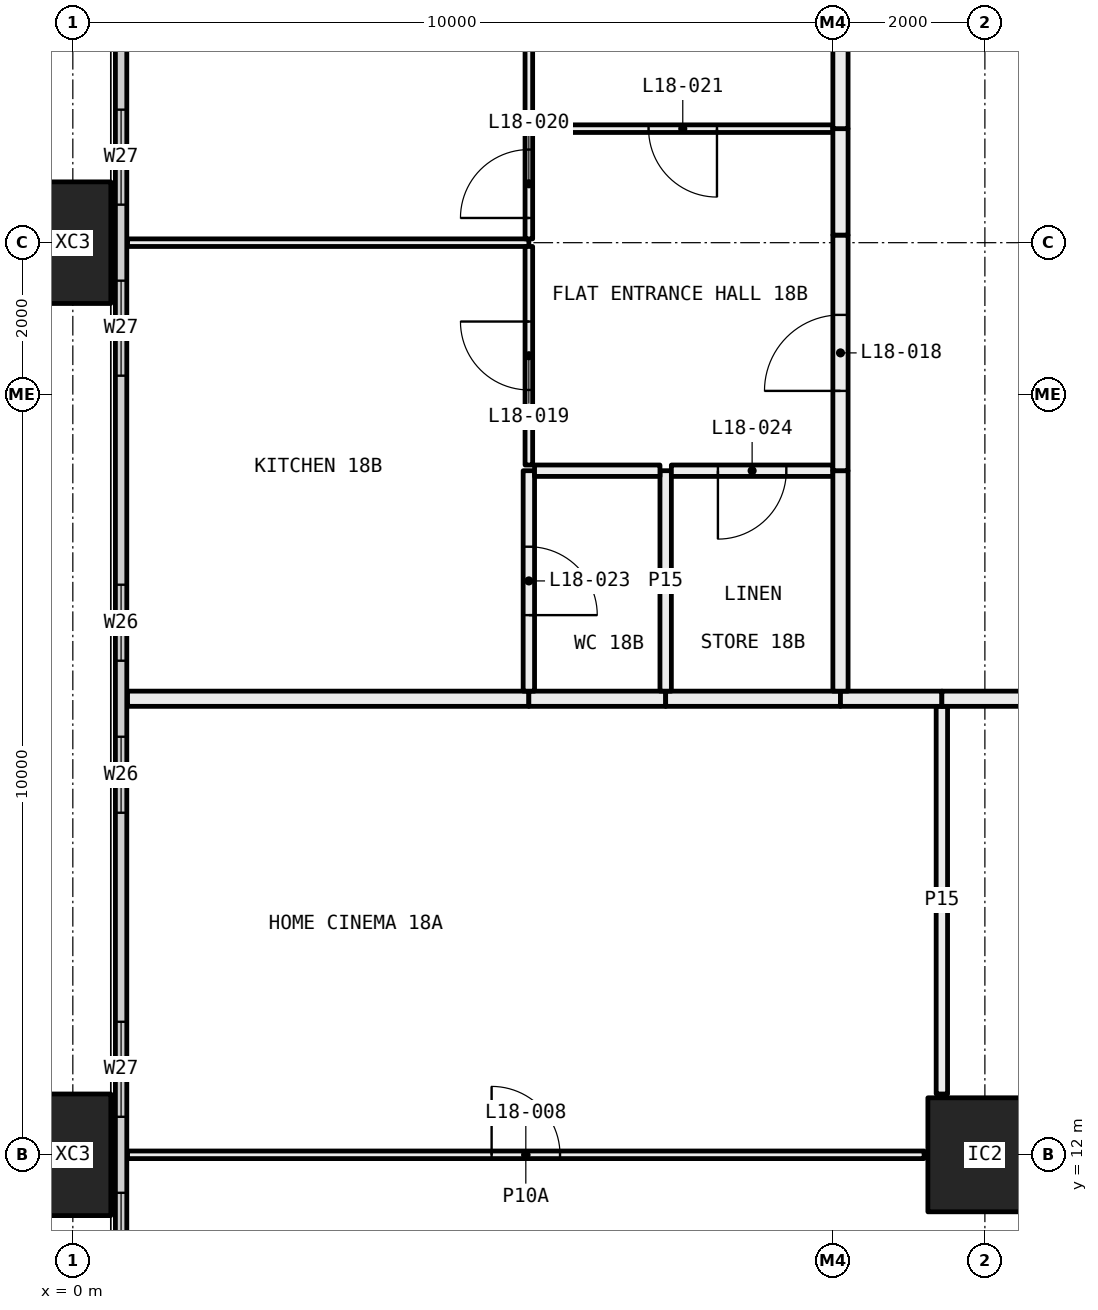
"""IFC4 building model, lengths in metres.
Left out: names, types, materials, properties, quantities, classifications, styles, units other than length and angle.
Written with IfcOpenShell. Run it as: python <this file> out.ifc"""

import sys

from ifc_helpers import new_model, si_unit, direction, frame, frame_2d, origin, origin_2d, place, context, subcontext, project, spatial, rectangle, hollow_rectangle, extrude, element, fill, save


model = new_model("IFC4")
c1 = context("Model", 3, precision=1e-05, world=origin(), true_north=direction((0.0, 1.0)))
c2 = subcontext(c1, "Body", "Model", "MODEL_VIEW")
j1 = project(units=[si_unit("LENGTHUNIT", "METRE"), si_unit("PLANEANGLEUNIT", "RADIAN")], contexts=[c1])
p1 = place(None, origin())
s1 = spatial("IfcSite", under=j1, at=p1, CompositionType="ELEMENT")
p2 = place(p1, origin())
s2 = spatial("IfcBuilding", under=s1, at=p2, CompositionType="ELEMENT")
p3 = place(p2, frame((0.0, 0.0, 74.85)))
s3 = spatial("IfcBuildingStorey", under=s2, at=p3, CompositionType="ELEMENT", Elevation=74.85)
for number, where, z_axis, x_axis in (
    (1, (0.0, 12.0, -0.4), (0.0, 0.0, 1.0), (0.0, 1.0, 0.0)),
    (2, (0.0, 24.0, -0.4), (0.0, 0.0, 1.0), (0.0, 1.0, 0.0)),
):
    element("IfcColumn", number, at=place(p3, frame(where, z_axis=z_axis, x_axis=x_axis)), inside=s3, PredefinedType="COLUMN", context=c2, shape_type="SweptSolid", body=[
        extrude(hollow_rectangle(XDim=1.6, YDim=1.0, WallThickness=0.065, at=origin_2d()), origin(), (0.0, 0.0, 1.0), 3.45),
    ])
p4 = place(p3, frame((12.0, 12.0, 0.0), z_axis=(0.0, 0.0, 1.0), x_axis=(1.0, 0.0, 0.0)))
e3 = element("IfcColumn", 3, at=p4, inside=s3, PredefinedType="COLUMN", context=c2, shape_type="SweptSolid", body=[
    extrude(hollow_rectangle(XDim=1.5, YDim=1.5, WallThickness=0.065, at=origin_2d()), origin(), (0.0, 0.0, 1.0), 3.05),
])
p5 = place(p3, frame((0.635, 6.71, 0.0), z_axis=(0.0, 0.0, 1.0), x_axis=(0.0, 1.0, 0.0)))
e4 = element("IfcWall", 4, at=p5, inside=s3, PredefinedType="ELEMENTEDWALL", context=c2, shape_type="SweptSolid", body=[
    extrude(rectangle(XDim=34.58, YDim=0.15, at=frame_2d((17.29, 0.0))), origin(), (0.0, 0.0, 1.0), 3.05),
])
p6 = place(p5, frame((0.29, 0.0, 0.45)))
e5 = element("IfcOpeningElement", 5, at=p6, cuts=e4, PredefinedType="OPENING", context=c2, shape_type="SweptSolid", body=[
    extrude(rectangle(XDim=4.5, YDim=2.55, at=frame_2d((2.25, 1.275))), frame((0.0, 0.085, 0.0), z_axis=(0.0, -1.0, 0.0), x_axis=(1.0, 0.0, 0.0)), (0.0, 0.0, 1.0), 0.17),
])
p7 = place(p5, frame((5.79, 0.0, 0.45)))
e6 = element("IfcOpeningElement", 6, at=p7, cuts=e4, PredefinedType="OPENING", context=c2, shape_type="SweptSolid", body=[
    extrude(rectangle(XDim=1.25, YDim=2.55, at=frame_2d((0.625, 1.275))), frame((0.0, 0.085, 0.0), z_axis=(0.0, -1.0, 0.0), x_axis=(1.0, 0.0, 0.0)), (0.0, 0.0, 1.0), 0.17),
])
p8 = place(p5, frame((9.79, 0.0, 0.45)))
e7 = element("IfcOpeningElement", 7, at=p8, cuts=e4, PredefinedType="OPENING", context=c2, shape_type="SweptSolid", body=[
    extrude(rectangle(XDim=1.0, YDim=2.55, at=frame_2d((0.5, 1.275))), frame((0.0, 0.085, 0.0), z_axis=(0.0, -1.0, 0.0), x_axis=(1.0, 0.0, 0.0)), (0.0, 0.0, 1.0), 0.17),
])
p9 = place(p5, frame((11.79, 0.0, 0.45)))
e8 = element("IfcOpeningElement", 8, at=p9, cuts=e4, PredefinedType="OPENING", context=c2, shape_type="SweptSolid", body=[
    extrude(rectangle(XDim=1.0, YDim=2.55, at=frame_2d((0.5, 1.275))), frame((0.0, 0.085, 0.0), z_axis=(0.0, -1.0, 0.0), x_axis=(1.0, 0.0, 0.0)), (0.0, 0.0, 1.0), 0.17),
])
p10 = place(p5, frame((15.54, 0.0, 0.45)))
e9 = element("IfcOpeningElement", 9, at=p10, cuts=e4, PredefinedType="OPENING", context=c2, shape_type="SweptSolid", body=[
    extrude(rectangle(XDim=1.25, YDim=2.55, at=frame_2d((0.625, 1.275))), frame((0.0, 0.085, 0.0), z_axis=(0.0, -1.0, 0.0), x_axis=(1.0, 0.0, 0.0)), (0.0, 0.0, 1.0), 0.17),
])
p11 = place(p5, frame((17.79, 0.0, 0.45)))
e10 = element("IfcOpeningElement", 10, at=p11, cuts=e4, PredefinedType="OPENING", context=c2, shape_type="SweptSolid", body=[
    extrude(rectangle(XDim=1.25, YDim=2.55, at=frame_2d((0.625, 1.275))), frame((0.0, 0.085, 0.0), z_axis=(0.0, -1.0, 0.0), x_axis=(1.0, 0.0, 0.0)), (0.0, 0.0, 1.0), 0.17),
])
p12 = place(p5, frame((21.79, 0.0, 0.45)))
e11 = element("IfcOpeningElement", 11, at=p12, cuts=e4, PredefinedType="OPENING", context=c2, shape_type="SweptSolid", body=[
    extrude(rectangle(XDim=1.0, YDim=2.55, at=frame_2d((0.5, 1.275))), frame((0.0, 0.085, 0.0), z_axis=(0.0, -1.0, 0.0), x_axis=(1.0, 0.0, 0.0)), (0.0, 0.0, 1.0), 0.17),
])
p13 = place(p5, frame((23.79, 0.0, 0.45)))
e12 = element("IfcOpeningElement", 12, at=p13, cuts=e4, PredefinedType="OPENING", context=c2, shape_type="SweptSolid", body=[
    extrude(rectangle(XDim=1.0, YDim=2.55, at=frame_2d((0.5, 1.275))), frame((0.0, 0.085, 0.0), z_axis=(0.0, -1.0, 0.0), x_axis=(1.0, 0.0, 0.0)), (0.0, 0.0, 1.0), 0.17),
])
p14 = place(p5, frame((27.54, 0.0, 0.45)))
e13 = element("IfcOpeningElement", 13, at=p14, cuts=e4, PredefinedType="OPENING", context=c2, shape_type="SweptSolid", body=[
    extrude(rectangle(XDim=1.25, YDim=2.55, at=frame_2d((0.625, 1.275))), frame((0.0, 0.085, 0.0), z_axis=(0.0, -1.0, 0.0), x_axis=(1.0, 0.0, 0.0)), (0.0, 0.0, 1.0), 0.17),
])
p15 = place(p5, frame((29.79, 0.0, 0.45)))
e14 = element("IfcOpeningElement", 14, at=p15, cuts=e4, PredefinedType="OPENING", context=c2, shape_type="SweptSolid", body=[
    extrude(rectangle(XDim=4.5, YDim=2.55, at=frame_2d((2.25, 1.275))), frame((0.0, 0.085, 0.0), z_axis=(0.0, -1.0, 0.0), x_axis=(1.0, 0.0, 0.0)), (0.0, 0.0, 1.0), 0.17),
])
p16 = place(p3, frame((11.2, 12.0, 0.0), z_axis=(0.0, 0.0, 1.0), x_axis=(-1.0, 0.0, 0.0)))
e15 = element("IfcWall", 15, at=p16, inside=s3, PredefinedType="PARTITIONING", context=c2, shape_type="SweptSolid", body=[
    extrude(rectangle(XDim=10.48, YDim=0.1, at=frame_2d((5.24, 0.0))), origin(), (0.0, 0.0, 1.0), 2.45),
])
p17 = place(p16, frame((4.79, 0.0, 0.0)))
e16 = element("IfcOpeningElement", 16, at=p17, cuts=e15, PredefinedType="OPENING", context=c2, shape_type="SweptSolid", body=[
    extrude(rectangle(XDim=0.9, YDim=2.1, at=frame_2d((0.45, 1.05))), frame((0.0, 0.06, 0.0), z_axis=(0.0, -1.0, 0.0), x_axis=(1.0, 0.0, 0.0)), (0.0, 0.0, 1.0), 0.12),
])
p18 = place(p3, frame((11.434, 12.8, 0.0), z_axis=(0.0, 0.0, 1.0), x_axis=(0.0, 1.0, 0.0)))
e17 = element("IfcWall", 17, at=p18, inside=s3, PredefinedType="PARTITIONING", context=c2, shape_type="SweptSolid", body=[
    extrude(rectangle(XDim=5.1, YDim=0.15, at=frame_2d((2.55, 0.0))), origin(), (0.0, 0.0, 1.0), 3.05),
])
p19 = place(p3, frame((6.0, 18.0, 0.0), z_axis=(0.0, 0.0, 1.0), x_axis=(-1.0, 0.0, 0.0)))
e18 = element("IfcWall", 18, at=p19, inside=s3, PredefinedType="PARTITIONING", context=c2, shape_type="SweptSolid", body=[
    extrude(rectangle(XDim=5.28, YDim=0.2, at=frame_2d((2.64, 0.0))), origin(), (0.0, 0.0, 1.0), 3.05),
])
p20 = place(p3, frame((7.8, 18.0, 0.0), z_axis=(0.0, 0.0, 1.0), x_axis=(-1.0, 0.0, 0.0)))
e19 = element("IfcWall", 19, at=p20, inside=s3, PredefinedType="PARTITIONING", context=c2, shape_type="SweptSolid", body=[
    extrude(rectangle(XDim=1.8, YDim=0.2, at=frame_2d((0.9, 0.0))), origin(), (0.0, 0.0, 1.0), 3.05),
])
p21 = place(p3, frame((10.1, 18.0, 0.0), z_axis=(0.0, 0.0, 1.0), x_axis=(-1.0, 0.0, 0.0)))
e20 = element("IfcWall", 20, at=p21, inside=s3, PredefinedType="PARTITIONING", context=c2, shape_type="SweptSolid", body=[
    extrude(rectangle(XDim=2.3, YDim=0.2, at=frame_2d((1.15, 0.0))), origin(), (0.0, 0.0, 1.0), 3.05),
])
p22 = place(p3, frame((11.434, 18.0, 0.0), z_axis=(0.0, 0.0, 1.0), x_axis=(-1.0, 0.0, 0.0)))
e21 = element("IfcWall", 21, at=p22, inside=s3, PredefinedType="PARTITIONING", context=c2, shape_type="SweptSolid", body=[
    extrude(rectangle(XDim=1.334, YDim=0.2, at=frame_2d((0.667, 0.0))), origin(), (0.0, 0.0, 1.0), 3.05),
])
p23 = place(p3, frame((18.0, 18.0, 0.0), z_axis=(0.0, 0.0, 1.0), x_axis=(-1.0, 0.0, 0.0)))
e22 = element("IfcWall", 22, at=p23, inside=s3, PredefinedType="PARTITIONING", context=c2, shape_type="SweptSolid", body=[
    extrude(rectangle(XDim=6.566, YDim=0.2, at=frame_2d((3.283, 0.0))), origin(), (0.0, 0.0, 1.0), 3.05),
])
p24 = place(p3, frame((6.0, 24.0, 0.0), z_axis=(0.0, 0.0, 1.0), x_axis=(-1.0, 0.0, 0.0)))
e23 = element("IfcWall", 23, at=p24, inside=s3, PredefinedType="PARTITIONING", context=c2, shape_type="SweptSolid", body=[
    extrude(rectangle(XDim=5.28, YDim=0.1, at=frame_2d((2.64, 0.0))), origin(), (0.0, 0.0, 1.0), 2.45),
])
p25 = place(p3, frame((6.0, 18.1, 0.0), z_axis=(0.0, 0.0, 1.0), x_axis=(0.0, 1.0, 0.0)))
e24 = element("IfcWall", 24, at=p25, inside=s3, PredefinedType="PARTITIONING", context=c2, shape_type="SweptSolid", body=[
    extrude(rectangle(XDim=2.9, YDim=0.15, at=frame_2d((1.45, 0.0))), origin(), (0.0, 0.0, 1.0), 3.05),
])
p26 = place(p25, frame((1.0, 0.0, 0.0)))
e25 = element("IfcOpeningElement", 25, at=p26, cuts=e24, PredefinedType="OPENING", context=c2, shape_type="SweptSolid", body=[
    extrude(rectangle(XDim=0.9, YDim=2.1, at=frame_2d((0.45, 1.05))), frame((0.0, 0.085, 0.0), z_axis=(0.0, -1.0, 0.0), x_axis=(1.0, 0.0, 0.0)), (0.0, 0.0, 1.0), 0.17),
])
p27 = place(p3, frame((6.0, 21.075, 0.0), z_axis=(0.0, 0.0, 1.0), x_axis=(0.0, 1.0, 0.0)))
e26 = element("IfcWall", 26, at=p27, inside=s3, PredefinedType="PARTITIONING", context=c2, shape_type="SweptSolid", body=[
    extrude(rectangle(XDim=2.875, YDim=0.1, at=frame_2d((1.438, 0.0))), origin(), (0.0, 0.0, 1.0), 2.45),
])
p28 = place(p27, frame((0.988, 0.0, 0.0)))
e27 = element("IfcOpeningElement", 27, at=p28, cuts=e26, PredefinedType="OPENING", context=c2, shape_type="SweptSolid", body=[
    extrude(rectangle(XDim=0.9, YDim=2.1, at=frame_2d((0.45, 1.05))), frame((0.0, 0.06, 0.0), z_axis=(0.0, -1.0, 0.0), x_axis=(1.0, 0.0, 0.0)), (0.0, 0.0, 1.0), 0.12),
])
p29 = place(p3, frame((6.0, 24.05, 0.0), z_axis=(0.0, 0.0, 1.0), x_axis=(0.0, 1.0, 0.0)))
e28 = element("IfcWall", 28, at=p29, inside=s3, PredefinedType="PARTITIONING", context=c2, shape_type="SweptSolid", body=[
    extrude(rectangle(XDim=1.45, YDim=0.1, at=frame_2d((0.725, 0.0))), origin(), (0.0, 0.0, 1.0), 2.45),
])
p30 = place(p29, frame((0.275, 0.0, 0.0)))
e29 = element("IfcOpeningElement", 29, at=p30, cuts=e28, PredefinedType="OPENING", context=c2, shape_type="SweptSolid", body=[
    extrude(rectangle(XDim=0.9, YDim=2.1, at=frame_2d((0.45, 1.05))), frame((0.0, 0.06, 0.0), z_axis=(0.0, -1.0, 0.0), x_axis=(1.0, 0.0, 0.0)), (0.0, 0.0, 1.0), 0.12),
])
p31 = place(p3, frame((6.0, 25.5, 0.0), z_axis=(0.0, 0.0, 1.0), x_axis=(0.0, 1.0, 0.0)))
e30 = element("IfcWall", 30, at=p31, inside=s3, PredefinedType="PARTITIONING", context=c2, shape_type="SweptSolid", body=[
    extrude(rectangle(XDim=10.45, YDim=0.1, at=frame_2d((5.225, 0.0))), origin(), (0.0, 0.0, 1.0), 2.45),
])
p32 = place(p3, frame((7.8, 18.1, 0.0), z_axis=(0.0, 0.0, 1.0), x_axis=(0.0, 1.0, 0.0)))
e31 = element("IfcWall", 31, at=p32, inside=s3, PredefinedType="PARTITIONING", context=c2, shape_type="SweptSolid", body=[
    extrude(rectangle(XDim=2.9, YDim=0.15, at=frame_2d((1.45, 0.0))), origin(), (0.0, 0.0, 1.0), 3.05),
])
p33 = place(p3, frame((7.725, 21.0, 0.0), z_axis=(0.0, 0.0, 1.0), x_axis=(-1.0, 0.0, 0.0)))
e32 = element("IfcWall", 32, at=p33, inside=s3, PredefinedType="PARTITIONING", context=c2, shape_type="SweptSolid", body=[
    extrude(rectangle(XDim=1.65, YDim=0.15, at=frame_2d((0.825, 0.0))), origin(), (0.0, 0.0, 1.0), 3.05),
])
p34 = place(p3, frame((10.0, 21.0, 0.0), z_axis=(0.0, 0.0, 1.0), x_axis=(-1.0, 0.0, 0.0)))
e33 = element("IfcWall", 33, at=p34, inside=s3, PredefinedType="PARTITIONING", context=c2, shape_type="SweptSolid", body=[
    extrude(rectangle(XDim=2.125, YDim=0.15, at=frame_2d((1.062, 0.0))), origin(), (0.0, 0.0, 1.0), 3.05),
])
p35 = place(p34, frame((0.613, 0.0, 0.0)))
e34 = element("IfcOpeningElement", 34, at=p35, cuts=e33, PredefinedType="OPENING", context=c2, shape_type="SweptSolid", body=[
    extrude(rectangle(XDim=0.9, YDim=2.1, at=frame_2d((0.45, 1.05))), frame((0.0, 0.085, 0.0), z_axis=(0.0, -1.0, 0.0), x_axis=(1.0, 0.0, 0.0)), (0.0, 0.0, 1.0), 0.17),
])
p36 = place(p3, frame((10.1, 18.1, 0.0), z_axis=(0.0, 0.0, 1.0), x_axis=(0.0, 1.0, 0.0)))
e35 = element("IfcWall", 35, at=p36, inside=s3, PredefinedType="PARTITIONING", context=c2, shape_type="SweptSolid", body=[
    extrude(rectangle(XDim=2.9, YDim=0.2, at=frame_2d((1.45, 0.0))), origin(), (0.0, 0.0, 1.0), 3.05),
])
p37 = place(p3, frame((10.0, 25.5, 0.0), z_axis=(0.0, 0.0, 1.0), x_axis=(-1.0, 0.0, 0.0)))
e36 = element("IfcWall", 36, at=p37, inside=s3, PredefinedType="PARTITIONING", context=c2, shape_type="SweptSolid", body=[
    extrude(rectangle(XDim=3.95, YDim=0.1, at=frame_2d((1.975, 0.0))), origin(), (0.0, 0.0, 1.0), 3.05),
])
p38 = place(p37, frame((1.525, 0.0, 0.0)))
e37 = element("IfcOpeningElement", 37, at=p38, cuts=e36, PredefinedType="OPENING", context=c2, shape_type="SweptSolid", body=[
    extrude(rectangle(XDim=0.9, YDim=2.1, at=frame_2d((0.45, 1.05))), frame((0.0, 0.06, 0.0), z_axis=(0.0, -1.0, 0.0), x_axis=(1.0, 0.0, 0.0)), (0.0, 0.0, 1.0), 0.12),
])
p39 = place(p3, frame((10.1, 21.0, 0.0), z_axis=(0.0, 0.0, 1.0), x_axis=(0.0, 1.0, 0.0)))
e38 = element("IfcWall", 38, at=p39, inside=s3, PredefinedType="PARTITIONING", context=c2, shape_type="SweptSolid", body=[
    extrude(rectangle(XDim=3.1, YDim=0.2, at=frame_2d((1.55, 0.0))), origin(), (0.0, 0.0, 1.0), 2.45),
])
p40 = place(p39, frame((1.05, 0.0, 0.0)))
e39 = element("IfcOpeningElement", 39, at=p40, cuts=e38, PredefinedType="OPENING", context=c2, shape_type="SweptSolid", body=[
    extrude(rectangle(XDim=1.0, YDim=2.1, at=frame_2d((0.5, 1.05))), frame((0.0, 0.11, 0.0), z_axis=(0.0, -1.0, 0.0), x_axis=(1.0, 0.0, 0.0)), (0.0, 0.0, 1.0), 0.22),
])
p41 = place(p3, frame((10.1, 24.1, 0.0), z_axis=(0.0, 0.0, 1.0), x_axis=(0.0, 1.0, 0.0)))
e40 = element("IfcWall", 40, at=p41, inside=s3, PredefinedType="PARTITIONING", context=c2, shape_type="SweptSolid", body=[
    extrude(rectangle(XDim=1.4, YDim=0.2, at=frame_2d((0.7, 0.0))), origin(), (0.0, 0.0, 1.0), 3.05),
])
p42 = place(p3, frame((10.1, 25.5, 0.0), z_axis=(0.0, 0.0, 1.0), x_axis=(0.0, 1.0, 0.0)))
e41 = element("IfcWall", 41, at=p42, inside=s3, PredefinedType="PARTITIONING", context=c2, shape_type="SweptSolid", body=[
    extrude(rectangle(XDim=10.6, YDim=0.2, at=frame_2d((5.3, 0.0))), origin(), (0.0, 0.0, 1.0), 2.45),
])
p43 = place(p6, origin())
e42 = element("IfcWindow", 42, at=p43, inside=s3, PartitioningType="SINGLE_PANEL", PredefinedType="WINDOW", context=c2, shape_type="SweptSolid", body=[
    extrude(rectangle(XDim=4.5, YDim=2.55, at=frame_2d((2.25, 1.275))), frame((0.0, 0.03, 0.0), z_axis=(0.0, -1.0, 0.0), x_axis=(1.0, 0.0, 0.0)), (0.0, 0.0, 1.0), 0.06),
])
fill(e5, e42)
p44 = place(p7, origin())
e43 = element("IfcWindow", 43, at=p44, inside=s3, PartitioningType="SINGLE_PANEL", PredefinedType="WINDOW", context=c2, shape_type="SweptSolid", body=[
    extrude(rectangle(XDim=1.25, YDim=2.55, at=frame_2d((0.625, 1.275))), frame((0.0, 0.03, 0.0), z_axis=(0.0, -1.0, 0.0), x_axis=(1.0, 0.0, 0.0)), (0.0, 0.0, 1.0), 0.06),
])
fill(e6, e43)
p45 = place(p8, origin())
e44 = element("IfcWindow", 44, at=p45, inside=s3, PartitioningType="SINGLE_PANEL", PredefinedType="WINDOW", context=c2, shape_type="SweptSolid", body=[
    extrude(rectangle(XDim=1.0, YDim=2.55, at=frame_2d((0.5, 1.275))), frame((0.0, 0.03, 0.0), z_axis=(0.0, -1.0, 0.0), x_axis=(1.0, 0.0, 0.0)), (0.0, 0.0, 1.0), 0.06),
])
fill(e7, e44)
p46 = place(p9, origin())
e45 = element("IfcWindow", 45, at=p46, inside=s3, PartitioningType="SINGLE_PANEL", PredefinedType="WINDOW", context=c2, shape_type="SweptSolid", body=[
    extrude(rectangle(XDim=1.0, YDim=2.55, at=frame_2d((0.5, 1.275))), frame((0.0, 0.03, 0.0), z_axis=(0.0, -1.0, 0.0), x_axis=(1.0, 0.0, 0.0)), (0.0, 0.0, 1.0), 0.06),
])
fill(e8, e45)
p47 = place(p10, origin())
e46 = element("IfcWindow", 46, at=p47, inside=s3, PartitioningType="SINGLE_PANEL", PredefinedType="WINDOW", context=c2, shape_type="SweptSolid", body=[
    extrude(rectangle(XDim=1.25, YDim=2.55, at=frame_2d((0.625, 1.275))), frame((0.0, 0.03, 0.0), z_axis=(0.0, -1.0, 0.0), x_axis=(1.0, 0.0, 0.0)), (0.0, 0.0, 1.0), 0.06),
])
fill(e9, e46)
p48 = place(p11, origin())
e47 = element("IfcWindow", 47, at=p48, inside=s3, PartitioningType="SINGLE_PANEL", PredefinedType="WINDOW", context=c2, shape_type="SweptSolid", body=[
    extrude(rectangle(XDim=1.25, YDim=2.55, at=frame_2d((0.625, 1.275))), frame((0.0, 0.03, 0.0), z_axis=(0.0, -1.0, 0.0), x_axis=(1.0, 0.0, 0.0)), (0.0, 0.0, 1.0), 0.06),
])
fill(e10, e47)
p49 = place(p17, frame((0.9, 0.0, 0.0), x_axis=(-1.0, 0.0, 0.0)))
e48 = element("IfcDoor", 48, at=p49, inside=s3, OperationType="SINGLE_SWING_RIGHT", PredefinedType="DOOR", context=c2, shape_type="SweptSolid", body=[
    extrude(rectangle(XDim=0.9, YDim=2.1, at=frame_2d((0.45, 1.05))), frame((0.0, 0.025, 0.0), z_axis=(0.0, -1.0, 0.0), x_axis=(1.0, 0.0, 0.0)), (0.0, 0.0, 1.0), 0.05),
])
fill(e16, e48)
p50 = place(p40, origin())
e49 = element("IfcDoor", 49, at=p50, inside=s3, OperationType="SINGLE_SWING_RIGHT", PredefinedType="DOOR", context=c2, shape_type="SweptSolid", body=[
    extrude(rectangle(XDim=1.0, YDim=2.1, at=frame_2d((0.5, 1.05))), frame((0.0, 0.025, 0.0), z_axis=(0.0, -1.0, 0.0), x_axis=(1.0, 0.0, 0.0)), (0.0, 0.0, 1.0), 0.05),
])
fill(e39, e49)
p51 = place(p28, origin())
e50 = element("IfcDoor", 50, at=p51, inside=s3, OperationType="SINGLE_SWING_LEFT", PredefinedType="DOOR", context=c2, shape_type="SweptSolid", body=[
    extrude(rectangle(XDim=0.9, YDim=2.1, at=frame_2d((0.45, 1.05))), frame((0.0, 0.025, 0.0), z_axis=(0.0, -1.0, 0.0), x_axis=(1.0, 0.0, 0.0)), (0.0, 0.0, 1.0), 0.05),
])
fill(e27, e50)
p52 = place(p30, origin())
e51 = element("IfcDoor", 51, at=p52, inside=s3, OperationType="SINGLE_SWING_RIGHT", PredefinedType="DOOR", context=c2, shape_type="SweptSolid", body=[
    extrude(rectangle(XDim=0.9, YDim=2.1, at=frame_2d((0.45, 1.05))), frame((0.0, 0.025, 0.0), z_axis=(0.0, -1.0, 0.0), x_axis=(1.0, 0.0, 0.0)), (0.0, 0.0, 1.0), 0.05),
])
fill(e29, e51)
p53 = place(p38, origin())
e52 = element("IfcDoor", 52, at=p53, inside=s3, OperationType="SINGLE_SWING_RIGHT", PredefinedType="DOOR", context=c2, shape_type="SweptSolid", body=[
    extrude(rectangle(XDim=0.9, YDim=2.1, at=frame_2d((0.45, 1.05))), frame((0.0, 0.025, 0.0), z_axis=(0.0, -1.0, 0.0), x_axis=(1.0, 0.0, 0.0)), (0.0, 0.0, 1.0), 0.05),
])
fill(e37, e52)
p54 = place(p26, frame((0.9, 0.0, 0.0), x_axis=(-1.0, 0.0, 0.0)))
e53 = element("IfcDoor", 53, at=p54, inside=s3, OperationType="SINGLE_SWING_LEFT", PredefinedType="DOOR", context=c2, shape_type="SweptSolid", body=[
    extrude(rectangle(XDim=0.9, YDim=2.1, at=frame_2d((0.45, 1.05))), frame((0.0, 0.025, 0.0), z_axis=(0.0, -1.0, 0.0), x_axis=(1.0, 0.0, 0.0)), (0.0, 0.0, 1.0), 0.05),
])
fill(e25, e53)
p55 = place(p35, origin())
e54 = element("IfcDoor", 54, at=p55, inside=s3, OperationType="SINGLE_SWING_LEFT", PredefinedType="DOOR", context=c2, shape_type="SweptSolid", body=[
    extrude(rectangle(XDim=0.9, YDim=2.1, at=frame_2d((0.45, 1.05))), frame((0.0, 0.025, 0.0), z_axis=(0.0, -1.0, 0.0), x_axis=(1.0, 0.0, 0.0)), (0.0, 0.0, 1.0), 0.05),
])
fill(e34, e54)
save(model, sys.argv[1])
